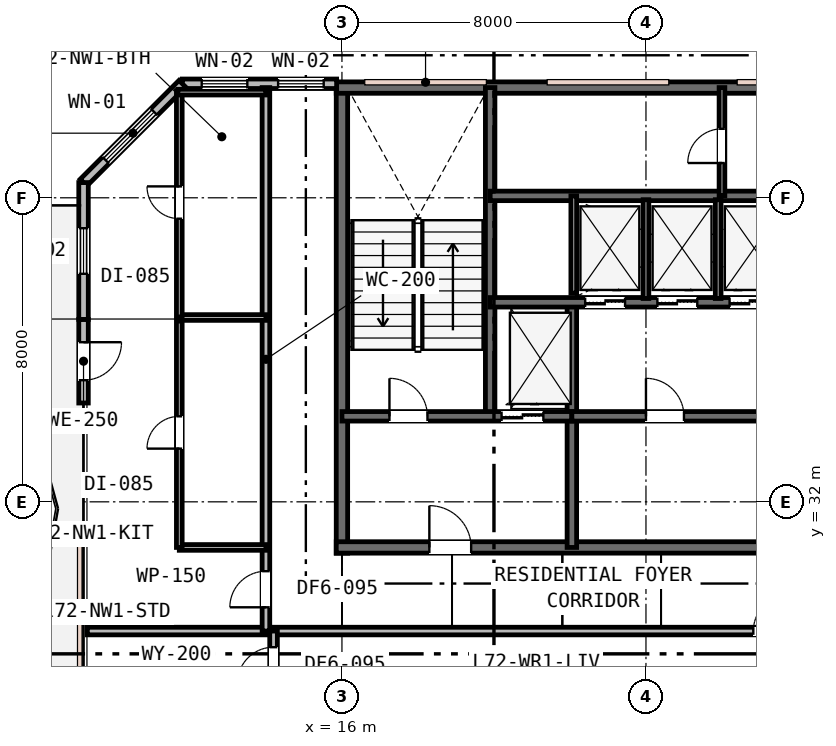
"""IFC4 building model, lengths in metres.
Left out: names, types, materials, properties, quantities, classifications, styles, units other than length and angle.
Written with IfcOpenShell. Run it as: python <this file> out.ifc"""

import sys

from ifc_helpers import new_model, si_unit, direction, frame, frame_2d, origin, place, context, subcontext, project, spatial, rectangle, extrude, element, fill, save


model = new_model("IFC4")
c1 = context("Model", 3, precision=1e-05, world=origin(), true_north=direction((0.0, 1.0)))
c2 = subcontext(c1, "Body", "Model", "MODEL_VIEW")
j1 = project(units=[si_unit("LENGTHUNIT", "METRE"), si_unit("PLANEANGLEUNIT", "RADIAN")], contexts=[c1])
p1 = place(None, origin())
s1 = spatial("IfcSite", under=j1, at=p1, CompositionType="ELEMENT")
p2 = place(p1, origin())
s2 = spatial("IfcBuilding", under=s1, at=p2, CompositionType="ELEMENT")
p3 = place(p2, frame((0.0, 0.0, 279.2)))
s3 = spatial("IfcBuildingStorey", under=s2, at=p3, CompositionType="ELEMENT", Elevation=279.2)
p4 = place(p3, frame((16.0, 30.65, 0.0), z_axis=(0.0, 0.0, 1.0), x_axis=(0.0, 1.0, 0.0)))
e1 = element("IfcWall", 1, at=p4, inside=s3, PredefinedType="SHEAR", context=c2, shape_type="SweptSolid", body=[
    extrude(rectangle(XDim=12.3, YDim=0.3, at=frame_2d((6.15, 0.0))), origin(), (0.0, 0.0, 1.0), 3.8),
])
p5 = place(p3, frame((15.85, 42.9, 0.0), z_axis=(0.0, 0.0, 1.0), x_axis=(1.0, 0.0, 0.0)))
e2 = element("IfcWall", 2, at=p5, inside=s3, PredefinedType="SHEAR", context=c2, shape_type="SweptSolid", body=[
    extrude(rectangle(XDim=24.3, YDim=0.3, at=frame_2d((12.15, 0.0))), origin(), (0.0, 0.0, 1.0), 3.8),
])
p6 = place(p3, frame((15.85, 30.8, 0.0), z_axis=(0.0, 0.0, 1.0), x_axis=(1.0, 0.0, 0.0)))
e3 = element("IfcWall", 3, at=p6, inside=s3, PredefinedType="SHEAR", context=c2, shape_type="SweptSolid", body=[
    extrude(rectangle(XDim=11.2, YDim=0.3, at=frame_2d((5.6, 0.0))), origin(), (0.0, 0.0, 1.0), 3.8),
])
p7 = place(p6, frame((2.45, 0.0, 0.0)))
e4 = element("IfcOpeningElement", 4, at=p7, cuts=e3, PredefinedType="OPENING", context=c2, shape_type="SweptSolid", body=[
    extrude(rectangle(XDim=1.1, YDim=2.15, at=frame_2d((0.55, 1.075))), frame((0.0, 0.16, 0.0), z_axis=(0.0, -1.0, 0.0), x_axis=(1.0, 0.0, 0.0)), (0.0, 0.0, 1.0), 0.32),
])
p8 = place(p3, frame((19.9, 34.25, 0.0), z_axis=(0.0, 0.0, 1.0), x_axis=(0.0, 1.0, 0.0)))
e5 = element("IfcWall", 5, at=p8, inside=s3, PredefinedType="SHEAR", context=c2, shape_type="SweptSolid", body=[
    extrude(rectangle(XDim=8.65, YDim=0.25, at=frame_2d((4.325, 0.0))), origin(), (0.0, 0.0, 1.0), 3.8),
])
p9 = place(p3, frame((22.05, 30.8, 0.0), z_axis=(0.0, 0.0, 1.0), x_axis=(0.0, 1.0, 0.0)))
e6 = element("IfcWall", 6, at=p9, inside=s3, PredefinedType="SHEAR", context=c2, shape_type="SweptSolid", body=[
    extrude(rectangle(XDim=6.45, YDim=0.25, at=frame_2d((3.225, 0.0))), origin(), (0.0, 0.0, 1.0), 3.8),
])
p10 = place(p3, frame((16.0, 34.25, 0.0), z_axis=(0.0, 0.0, 1.0), x_axis=(1.0, 0.0, 0.0)))
e7 = element("IfcWall", 7, at=p10, inside=s3, PredefinedType="SHEAR", context=c2, shape_type="SweptSolid", body=[
    extrude(rectangle(XDim=6.05, YDim=0.25, at=frame_2d((3.025, 0.0))), origin(), (0.0, 0.0, 1.0), 3.8),
])
p11 = place(p10, frame((1.25, 0.0, 0.0)))
e8 = element("IfcOpeningElement", 8, at=p11, cuts=e7, PredefinedType="OPENING", context=c2, shape_type="SweptSolid", body=[
    extrude(rectangle(XDim=1.0, YDim=2.15, at=frame_2d((0.5, 1.075))), frame((0.0, 0.135, 0.0), z_axis=(0.0, -1.0, 0.0), x_axis=(1.0, 0.0, 0.0)), (0.0, 0.0, 1.0), 0.27),
])
p12 = place(p10, frame((4.2, 0.0, 0.0)))
e9 = element("IfcOpeningElement", 9, at=p12, cuts=e7, PredefinedType="OPENING", context=c2, shape_type="SweptSolid", body=[
    extrude(rectangle(XDim=1.1, YDim=2.15, at=frame_2d((0.55, 1.075))), frame((0.0, 0.135, 0.0), z_axis=(0.0, -1.0, 0.0), x_axis=(1.0, 0.0, 0.0)), (0.0, 0.0, 1.0), 0.27),
])
p13 = place(p3, frame((22.05, 34.25, 0.0), z_axis=(0.0, 0.0, 1.0), x_axis=(1.0, 0.0, 0.0)))
e10 = element("IfcWall", 10, at=p13, inside=s3, PredefinedType="SHEAR", context=c2, shape_type="SweptSolid", body=[
    extrude(rectangle(XDim=5.0, YDim=0.25, at=frame_2d((2.5, 0.0))), origin(), (0.0, 0.0, 1.0), 3.8),
])
p14 = place(p13, frame((1.95, 0.0, 0.0)))
e11 = element("IfcOpeningElement", 11, at=p14, cuts=e10, PredefinedType="OPENING", context=c2, shape_type="SweptSolid", body=[
    extrude(rectangle(XDim=1.0, YDim=2.15, at=frame_2d((0.5, 1.075))), frame((0.0, 0.135, 0.0), z_axis=(0.0, -1.0, 0.0), x_axis=(1.0, 0.0, 0.0)), (0.0, 0.0, 1.0), 0.27),
])
p15 = place(p3, frame((19.9, 37.25, 0.0), z_axis=(0.0, 0.0, 1.0), x_axis=(1.0, 0.0, 0.0)))
e12 = element("IfcWall", 12, at=p15, inside=s3, PredefinedType="SHEAR", context=c2, shape_type="SweptSolid", body=[
    extrude(rectangle(XDim=16.2, YDim=0.25, at=frame_2d((8.1, 0.0))), origin(), (0.0, 0.0, 1.0), 3.8),
])
p16 = place(p15, frame((12.55, 0.0, 0.0)))
e13 = element("IfcOpeningElement", 13, at=p16, cuts=e12, PredefinedType="OPENING", context=c2, shape_type="SweptSolid", body=[
    extrude(rectangle(XDim=0.9, YDim=2.15, at=frame_2d((0.45, 1.075))), frame((0.0, 0.135, 0.0), z_axis=(0.0, -1.0, 0.0), x_axis=(1.0, 0.0, 0.0)), (0.0, 0.0, 1.0), 0.27),
])
p17 = place(p15, frame((2.5, 0.0, 0.0)))
e14 = element("IfcOpeningElement", 14, at=p17, cuts=e12, PredefinedType="OPENING", context=c2, shape_type="SweptSolid", body=[
    extrude(rectangle(XDim=1.05, YDim=2.15, at=frame_2d((0.525, 1.075))), frame((0.0, 0.135, 0.0), z_axis=(0.0, -1.0, 0.0), x_axis=(1.0, 0.0, 0.0)), (0.0, 0.0, 1.0), 0.27),
])
p18 = place(p15, frame((4.4, 0.0, 0.0)))
e15 = element("IfcOpeningElement", 15, at=p18, cuts=e12, PredefinedType="OPENING", context=c2, shape_type="SweptSolid", body=[
    extrude(rectangle(XDim=1.05, YDim=2.15, at=frame_2d((0.525, 1.075))), frame((0.0, 0.135, 0.0), z_axis=(0.0, -1.0, 0.0), x_axis=(1.0, 0.0, 0.0)), (0.0, 0.0, 1.0), 0.27),
])
p19 = place(p15, frame((6.3, 0.0, 0.0)))
e16 = element("IfcOpeningElement", 16, at=p19, cuts=e12, PredefinedType="OPENING", context=c2, shape_type="SweptSolid", body=[
    extrude(rectangle(XDim=1.05, YDim=2.15, at=frame_2d((0.525, 1.075))), frame((0.0, 0.135, 0.0), z_axis=(0.0, -1.0, 0.0), x_axis=(1.0, 0.0, 0.0)), (0.0, 0.0, 1.0), 0.27),
])
p20 = place(p3, frame((19.9, 40.05, 0.0), z_axis=(0.0, 0.0, 1.0), x_axis=(1.0, 0.0, 0.0)))
e17 = element("IfcWall", 17, at=p20, inside=s3, PredefinedType="SHEAR", context=c2, shape_type="SweptSolid", body=[
    extrude(rectangle(XDim=12.05, YDim=0.25, at=frame_2d((6.025, 0.0))), origin(), (0.0, 0.0, 1.0), 3.8),
])
p21 = place(p3, frame((15.86, 43.0, 0.0), z_axis=(0.0, 0.0, 1.0), x_axis=(-1.0, 0.0, 0.0)))
e18 = element("IfcWall", 18, at=p21, inside=s3, PredefinedType="STANDARD", context=c2, shape_type="SweptSolid", body=[
    extrude(rectangle(XDim=4.06, YDim=0.25, at=frame_2d((2.03, 0.0))), origin(), (0.0, 0.0, 1.0), 3.53),
])
p22 = place(p21, frame((0.34, 0.0, 0.85)))
e19 = element("IfcOpeningElement", 19, at=p22, cuts=e18, PredefinedType="OPENING", context=c2, shape_type="SweptSolid", body=[
    extrude(rectangle(XDim=1.2, YDim=1.6, at=frame_2d((0.6, 0.8))), frame((0.0, 0.135, 0.0), z_axis=(0.0, -1.0, 0.0), x_axis=(1.0, 0.0, 0.0)), (0.0, 0.0, 1.0), 0.27),
])
p23 = place(p21, frame((2.35, 0.0, 0.85)))
e20 = element("IfcOpeningElement", 20, at=p23, cuts=e18, PredefinedType="OPENING", context=c2, shape_type="SweptSolid", body=[
    extrude(rectangle(XDim=1.2, YDim=1.6, at=frame_2d((0.6, 0.8))), frame((0.0, 0.135, 0.0), z_axis=(0.0, -1.0, 0.0), x_axis=(1.0, 0.0, 0.0)), (0.0, 0.0, 1.0), 0.27),
])
p24 = place(p3, frame((11.8, 43.0, 0.0), z_axis=(0.0, 0.0, 1.0), x_axis=(-0.707106781187, -0.707106781187, 0.0)))
e21 = element("IfcWall", 21, at=p24, inside=s3, PredefinedType="STANDARD", context=c2, shape_type="SweptSolid", body=[
    extrude(rectangle(XDim=3.677, YDim=0.25, at=frame_2d((1.839, 0.0))), origin(), (0.0, 0.0, 1.0), 3.53),
])
p25 = place(p24, frame((1.049, 0.0, 0.75)))
e22 = element("IfcOpeningElement", 22, at=p25, cuts=e21, PredefinedType="OPENING", context=c2, shape_type="SweptSolid", body=[
    extrude(rectangle(XDim=1.8, YDim=1.85, at=frame_2d((0.9, 0.925))), frame((0.0, 0.135, 0.0), z_axis=(0.0, -1.0, 0.0), x_axis=(1.0, 0.0, 0.0)), (0.0, 0.0, 1.0), 0.27),
])
p26 = place(p3, frame((9.2, 36.8, 0.0), z_axis=(0.0, 0.0, 1.0), x_axis=(0.0, -1.0, 0.0)))
e23 = element("IfcWall", 23, at=p26, inside=s3, PredefinedType="STANDARD", context=c2, shape_type="SweptSolid", body=[
    extrude(rectangle(XDim=2.2, YDim=0.25, at=frame_2d((1.1, 0.0))), origin(), (0.0, 0.0, 1.0), 3.53),
])
p27 = place(p26, frame((0.6, 0.0, 0.0)))
e24 = element("IfcOpeningElement", 24, at=p27, cuts=e23, PredefinedType="OPENING", context=c2, shape_type="SweptSolid", body=[
    extrude(rectangle(XDim=1.0, YDim=2.15, at=frame_2d((0.5, 1.075))), frame((0.0, 0.135, 0.0), z_axis=(0.0, -1.0, 0.0), x_axis=(1.0, 0.0, 0.0)), (0.0, 0.0, 1.0), 0.27),
])
p28 = place(p3, frame((9.2, 40.4, 0.0), z_axis=(0.0, 0.0, 1.0), x_axis=(0.0, -1.0, 0.0)))
e25 = element("IfcWall", 25, at=p28, inside=s3, PredefinedType="STANDARD", context=c2, shape_type="SweptSolid", body=[
    extrude(rectangle(XDim=3.6, YDim=0.25, at=frame_2d((1.8, 0.0))), origin(), (0.0, 0.0, 1.0), 3.53),
])
p29 = place(p28, frame((1.2, 0.0, 0.85)))
e26 = element("IfcOpeningElement", 26, at=p29, cuts=e25, PredefinedType="OPENING", context=c2, shape_type="SweptSolid", body=[
    extrude(rectangle(XDim=1.2, YDim=1.6, at=frame_2d((0.6, 0.8))), frame((0.0, 0.135, 0.0), z_axis=(0.0, -1.0, 0.0), x_axis=(1.0, 0.0, 0.0)), (0.0, 0.0, 1.0), 0.27),
])
p30 = place(p3, frame((22.1, 37.49, 0.0), z_axis=(0.0, 0.0, 1.0), x_axis=(0.0, 1.0, 0.0)))
e27 = element("IfcWall", 27, at=p30, inside=s3, PredefinedType="PLUMBINGWALL", context=c2, shape_type="SweptSolid", body=[
    extrude(rectangle(XDim=2.56, YDim=0.15, at=frame_2d((1.28, 0.0))), origin(), (0.0, 0.0, 1.0), 3.53),
])
for number, where, z_axis, x_axis in (
    (28, (24.0, 37.35, 0.0), (0.0, 0.0, 1.0), (0.0, 1.0, 0.0)),
    (29, (25.9, 37.35, 0.0), (0.0, 0.0, 1.0), (0.0, 1.0, 0.0)),
):
    element("IfcWall", number, at=place(p3, frame(where, z_axis=z_axis, x_axis=x_axis)), inside=s3, PredefinedType="PLUMBINGWALL", context=c2, shape_type="SweptSolid", body=[
        extrude(rectangle(XDim=2.6, YDim=0.15, at=frame_2d((1.3, 0.0))), origin(), (0.0, 0.0, 1.0), 3.53),
    ])
p31 = place(p3, frame((26.0, 40.05, 0.0), z_axis=(0.0, 0.0, 1.0), x_axis=(0.0, 1.0, 0.0)))
e30 = element("IfcWall", 30, at=p31, inside=s3, PredefinedType="PARTITIONING", context=c2, shape_type="SweptSolid", body=[
    extrude(rectangle(XDim=2.85, YDim=0.15, at=frame_2d((1.425, 0.0))), origin(), (0.0, 0.0, 1.0), 3.53),
])
p32 = place(p31, frame((0.865, 0.0, 0.0)))
e31 = element("IfcOpeningElement", 31, at=p32, cuts=e30, PredefinedType="OPENING", context=c2, shape_type="SweptSolid", body=[
    extrude(rectangle(XDim=0.9, YDim=2.15, at=frame_2d((0.45, 1.075))), frame((0.0, 0.085, 0.0), z_axis=(0.0, -1.0, 0.0), x_axis=(1.0, 0.0, 0.0)), (0.0, 0.0, 1.0), 0.17),
])
p33 = place(p3, frame((9.3, 28.6, 0.0), z_axis=(0.0, 0.0, 1.0), x_axis=(1.0, 0.0, 0.0)))
e32 = element("IfcWall", 32, at=p33, inside=s3, PredefinedType="PARTITIONING", context=c2, shape_type="SweptSolid", body=[
    extrude(rectangle(XDim=4.7, YDim=0.2, at=frame_2d((2.35, 0.0))), origin(), (0.0, 0.0, 1.0), 3.53),
])
p34 = place(p3, frame((14.2, 28.6, 0.0), z_axis=(0.0, 0.0, 1.0), x_axis=(1.0, 0.0, 0.0)))
e33 = element("IfcWall", 33, at=p34, inside=s3, PredefinedType="PARTITIONING", context=c2, shape_type="SweptSolid", body=[
    extrude(rectangle(XDim=31.7, YDim=0.2, at=frame_2d((15.85, 0.0))), origin(), (0.0, 0.0, 1.0), 3.16),
])
p35 = place(p34, frame((12.625, 0.0, 0.0)))
e34 = element("IfcOpeningElement", 34, at=p35, cuts=e33, PredefinedType="OPENING", context=c2, shape_type="SweptSolid", body=[
    extrude(rectangle(XDim=0.95, YDim=2.15, at=frame_2d((0.475, 1.075))), frame((0.0, 0.11, 0.0), z_axis=(0.0, -1.0, 0.0), x_axis=(1.0, 0.0, 0.0)), (0.0, 0.0, 1.0), 0.22),
])
p36 = place(p34, frame((19.125, 0.0, 0.0)))
e35 = element("IfcOpeningElement", 35, at=p36, cuts=e33, PredefinedType="OPENING", context=c2, shape_type="SweptSolid", body=[
    extrude(rectangle(XDim=0.95, YDim=2.15, at=frame_2d((0.475, 1.075))), frame((0.0, 0.11, 0.0), z_axis=(0.0, -1.0, 0.0), x_axis=(1.0, 0.0, 0.0)), (0.0, 0.0, 1.0), 0.22),
])
p37 = place(p34, frame((24.016, 0.0, 0.0)))
e36 = element("IfcOpeningElement", 36, at=p37, cuts=e33, PredefinedType="OPENING", context=c2, shape_type="SweptSolid", body=[
    extrude(rectangle(XDim=0.95, YDim=2.15, at=frame_2d((0.475, 1.075))), frame((0.0, 0.11, 0.0), z_axis=(0.0, -1.0, 0.0), x_axis=(1.0, 0.0, 0.0)), (0.0, 0.0, 1.0), 0.22),
])
p38 = place(p3, frame((14.0, 28.6, 0.0), z_axis=(0.0, 0.0, 1.0), x_axis=(0.0, 1.0, 0.0)))
e37 = element("IfcWall", 37, at=p38, inside=s3, PredefinedType="PARTITIONING", context=c2, shape_type="SweptSolid", body=[
    extrude(rectangle(XDim=14.3, YDim=0.2, at=frame_2d((7.15, 0.0))), origin(), (0.0, 0.0, 1.0), 3.53),
])
p39 = place(p38, frame((0.625, 0.0, 0.0)))
e38 = element("IfcOpeningElement", 38, at=p39, cuts=e37, PredefinedType="OPENING", context=c2, shape_type="SweptSolid", body=[
    extrude(rectangle(XDim=0.95, YDim=2.15, at=frame_2d((0.475, 1.075))), frame((0.0, 0.11, 0.0), z_axis=(0.0, -1.0, 0.0), x_axis=(1.0, 0.0, 0.0)), (0.0, 0.0, 1.0), 0.22),
])
for number, where, z_axis, x_axis in (
    (39, (11.72, 30.8, 0.0), (0.0, 0.0, 1.0), (1.0, 0.0, 0.0)),
    (40, (11.72, 36.85, 0.0), (0.0, 0.0, 1.0), (1.0, 0.0, 0.0)),
):
    element("IfcWall", number, at=place(p3, frame(where, z_axis=z_axis, x_axis=x_axis)), inside=s3, PredefinedType="PARTITIONING", context=c2, shape_type="SweptSolid", body=[
        extrude(rectangle(XDim=2.28, YDim=0.15, at=frame_2d((1.14, 0.0))), origin(), (0.0, 0.0, 1.0), 3.53),
    ])
p40 = place(p3, frame((11.72, 30.8, 0.0), z_axis=(0.0, 0.0, 1.0), x_axis=(0.0, 1.0, 0.0)))
e41 = element("IfcWall", 41, at=p40, inside=s3, PredefinedType="PARTITIONING", context=c2, shape_type="SweptSolid", body=[
    extrude(rectangle(XDim=12.02, YDim=0.15, at=frame_2d((6.01, 0.0))), origin(), (0.0, 0.0, 1.0), 3.53),
])
p41 = place(p40, frame((2.6, 0.0, 0.0)))
e42 = element("IfcOpeningElement", 42, at=p41, cuts=e41, PredefinedType="OPENING", context=c2, shape_type="SweptSolid", body=[
    extrude(rectangle(XDim=0.85, YDim=2.15, at=frame_2d((0.425, 1.075))), frame((0.0, 0.085, 0.0), z_axis=(0.0, -1.0, 0.0), x_axis=(1.0, 0.0, 0.0)), (0.0, 0.0, 1.0), 0.17),
])
p42 = place(p40, frame((8.65, 0.0, 0.0)))
e43 = element("IfcOpeningElement", 43, at=p42, cuts=e41, PredefinedType="OPENING", context=c2, shape_type="SweptSolid", body=[
    extrude(rectangle(XDim=0.85, YDim=2.15, at=frame_2d((0.425, 1.075))), frame((0.0, 0.085, 0.0), z_axis=(0.0, -1.0, 0.0), x_axis=(1.0, 0.0, 0.0)), (0.0, 0.0, 1.0), 0.17),
])
p43 = place(p3, frame((11.68, 42.78, 0.0), z_axis=(0.0, 0.0, 1.0), x_axis=(1.0, 0.0, 0.0)))
e44 = element("IfcWall", 44, at=p43, inside=s3, PredefinedType="PARTITIONING", context=c2, shape_type="SweptSolid", body=[
    extrude(rectangle(XDim=2.32, YDim=0.15, at=frame_2d((1.16, 0.0))), origin(), (0.0, 0.0, 1.0), 3.53),
])
p44 = place(p3, frame((14.2, 17.0, 0.0), z_axis=(0.0, 0.0, 1.0), x_axis=(0.0, 1.0, 0.0)))
e45 = element("IfcWall", 45, at=p44, inside=s3, PredefinedType="PARTITIONING", context=c2, shape_type="SweptSolid", body=[
    extrude(rectangle(XDim=11.6, YDim=0.2, at=frame_2d((5.8, 0.0))), origin(), (0.0, 0.0, 1.0), 3.53),
])
p45 = place(p44, frame((10.225, 0.0, 0.0)))
e46 = element("IfcOpeningElement", 46, at=p45, cuts=e45, PredefinedType="OPENING", context=c2, shape_type="SweptSolid", body=[
    extrude(rectangle(XDim=0.95, YDim=2.15, at=frame_2d((0.475, 1.075))), frame((0.0, 0.11, 0.0), z_axis=(0.0, -1.0, 0.0), x_axis=(1.0, 0.0, 0.0)), (0.0, 0.0, 1.0), 0.22),
])
p46 = place(p22, origin())
e47 = element("IfcWindow", 47, at=p46, inside=s3, PartitioningType="SINGLE_PANEL", PredefinedType="WINDOW", context=c2, shape_type="SweptSolid", body=[
    extrude(rectangle(XDim=1.2, YDim=1.6, at=frame_2d((0.6, 0.8))), frame((0.0, 0.03, 0.0), z_axis=(0.0, -1.0, 0.0), x_axis=(1.0, 0.0, 0.0)), (0.0, 0.0, 1.0), 0.06),
])
fill(e19, e47)
p47 = place(p23, origin())
e48 = element("IfcWindow", 48, at=p47, inside=s3, PartitioningType="SINGLE_PANEL", PredefinedType="WINDOW", context=c2, shape_type="SweptSolid", body=[
    extrude(rectangle(XDim=1.2, YDim=1.6, at=frame_2d((0.6, 0.8))), frame((0.0, 0.03, 0.0), z_axis=(0.0, -1.0, 0.0), x_axis=(1.0, 0.0, 0.0)), (0.0, 0.0, 1.0), 0.06),
])
fill(e20, e48)
p48 = place(p25, origin())
e49 = element("IfcWindow", 49, at=p48, inside=s3, PartitioningType="SINGLE_PANEL", PredefinedType="WINDOW", context=c2, shape_type="SweptSolid", body=[
    extrude(rectangle(XDim=1.8, YDim=1.85, at=frame_2d((0.9, 0.925))), frame((0.0, 0.03, 0.0), z_axis=(0.0, -1.0, 0.0), x_axis=(1.0, 0.0, 0.0)), (0.0, 0.0, 1.0), 0.06),
])
fill(e22, e49)
p49 = place(p27, origin())
e50 = element("IfcDoor", 50, at=p49, inside=s3, OperationType="SINGLE_SWING_LEFT", PredefinedType="DOOR", context=c2, shape_type="SweptSolid", body=[
    extrude(rectangle(XDim=1.0, YDim=2.15, at=frame_2d((0.5, 1.075))), frame((0.0, 0.025, 0.0), z_axis=(0.0, -1.0, 0.0), x_axis=(1.0, 0.0, 0.0)), (0.0, 0.0, 1.0), 0.05),
])
fill(e24, e50)
p50 = place(p29, origin())
e51 = element("IfcWindow", 51, at=p50, inside=s3, PartitioningType="SINGLE_PANEL", PredefinedType="WINDOW", context=c2, shape_type="SweptSolid", body=[
    extrude(rectangle(XDim=1.2, YDim=1.6, at=frame_2d((0.6, 0.8))), frame((0.0, 0.03, 0.0), z_axis=(0.0, -1.0, 0.0), x_axis=(1.0, 0.0, 0.0)), (0.0, 0.0, 1.0), 0.06),
])
fill(e26, e51)
p51 = place(p11, origin())
e52 = element("IfcDoor", 52, at=p51, inside=s3, OperationType="SINGLE_SWING_LEFT", PredefinedType="DOOR", context=c2, shape_type="SweptSolid", body=[
    extrude(rectangle(XDim=1.0, YDim=2.15, at=frame_2d((0.5, 1.075))), frame((0.0, 0.025, 0.0), z_axis=(0.0, -1.0, 0.0), x_axis=(1.0, 0.0, 0.0)), (0.0, 0.0, 1.0), 0.05),
])
fill(e8, e52)
p52 = place(p7, origin())
e53 = element("IfcDoor", 53, at=p52, inside=s3, OperationType="SINGLE_SWING_LEFT", PredefinedType="DOOR", context=c2, shape_type="SweptSolid", body=[
    extrude(rectangle(XDim=1.1, YDim=2.15, at=frame_2d((0.55, 1.075))), frame((0.0, 0.025, 0.0), z_axis=(0.0, -1.0, 0.0), x_axis=(1.0, 0.0, 0.0)), (0.0, 0.0, 1.0), 0.05),
])
fill(e4, e53)
p53 = place(p14, origin())
e54 = element("IfcDoor", 54, at=p53, inside=s3, OperationType="SINGLE_SWING_LEFT", PredefinedType="DOOR", context=c2, shape_type="SweptSolid", body=[
    extrude(rectangle(XDim=1.0, YDim=2.15, at=frame_2d((0.5, 1.075))), frame((0.0, 0.025, 0.0), z_axis=(0.0, -1.0, 0.0), x_axis=(1.0, 0.0, 0.0)), (0.0, 0.0, 1.0), 0.05),
])
fill(e11, e54)
p54 = place(p32, origin())
e55 = element("IfcDoor", 55, at=p54, inside=s3, OperationType="SINGLE_SWING_LEFT", PredefinedType="DOOR", context=c2, shape_type="SweptSolid", body=[
    extrude(rectangle(XDim=0.9, YDim=2.15, at=frame_2d((0.45, 1.075))), frame((0.0, 0.025, 0.0), z_axis=(0.0, -1.0, 0.0), x_axis=(1.0, 0.0, 0.0)), (0.0, 0.0, 1.0), 0.05),
])
fill(e31, e55)
p55 = place(p39, origin())
e56 = element("IfcDoor", 56, at=p55, inside=s3, OperationType="SINGLE_SWING_LEFT", PredefinedType="DOOR", context=c2, shape_type="SweptSolid", body=[
    extrude(rectangle(XDim=0.95, YDim=2.15, at=frame_2d((0.475, 1.075))), frame((0.0, 0.025, 0.0), z_axis=(0.0, -1.0, 0.0), x_axis=(1.0, 0.0, 0.0)), (0.0, 0.0, 1.0), 0.05),
])
fill(e38, e56)
p56 = place(p41, origin())
e57 = element("IfcDoor", 57, at=p56, inside=s3, OperationType="SINGLE_SWING_LEFT", PredefinedType="DOOR", context=c2, shape_type="SweptSolid", body=[
    extrude(rectangle(XDim=0.85, YDim=2.15, at=frame_2d((0.425, 1.075))), frame((0.0, 0.025, 0.0), z_axis=(0.0, -1.0, 0.0), x_axis=(1.0, 0.0, 0.0)), (0.0, 0.0, 1.0), 0.05),
])
fill(e42, e57)
p57 = place(p42, origin())
e58 = element("IfcDoor", 58, at=p57, inside=s3, OperationType="SINGLE_SWING_RIGHT", PredefinedType="DOOR", context=c2, shape_type="SweptSolid", body=[
    extrude(rectangle(XDim=0.85, YDim=2.15, at=frame_2d((0.425, 1.075))), frame((0.0, 0.025, 0.0), z_axis=(0.0, -1.0, 0.0), x_axis=(1.0, 0.0, 0.0)), (0.0, 0.0, 1.0), 0.05),
])
fill(e43, e58)
p58 = place(p35, origin())
e59 = element("IfcDoor", 59, at=p58, inside=s3, OperationType="SINGLE_SWING_RIGHT", PredefinedType="DOOR", context=c2, shape_type="SweptSolid", body=[
    extrude(rectangle(XDim=0.95, YDim=2.15, at=frame_2d((0.475, 1.075))), frame((0.0, 0.025, 0.0), z_axis=(0.0, -1.0, 0.0), x_axis=(1.0, 0.0, 0.0)), (0.0, 0.0, 1.0), 0.05),
])
fill(e34, e59)
p59 = place(p45, origin())
e60 = element("IfcDoor", 60, at=p59, inside=s3, OperationType="SINGLE_SWING_LEFT", PredefinedType="DOOR", context=c2, shape_type="SweptSolid", body=[
    extrude(rectangle(XDim=0.95, YDim=2.15, at=frame_2d((0.475, 1.075))), frame((0.0, 0.025, 0.0), z_axis=(0.0, -1.0, 0.0), x_axis=(1.0, 0.0, 0.0)), (0.0, 0.0, 1.0), 0.05),
])
fill(e46, e60)
p60 = place(p12, origin())
e61 = element("IfcDoor", 61, at=p60, inside=s3, OperationType="DOUBLE_DOOR_SLIDING", PredefinedType="DOOR", context=c2, shape_type="SweptSolid", body=[
    extrude(rectangle(XDim=1.1, YDim=2.15, at=frame_2d((0.55, 1.075))), frame((0.0, 0.025, 0.0), z_axis=(0.0, -1.0, 0.0), x_axis=(1.0, 0.0, 0.0)), (0.0, 0.0, 1.0), 0.05),
])
fill(e9, e61)
p61 = place(p17, origin())
e62 = element("IfcDoor", 62, at=p61, inside=s3, OperationType="DOUBLE_DOOR_SLIDING", PredefinedType="DOOR", context=c2, shape_type="SweptSolid", body=[
    extrude(rectangle(XDim=1.05, YDim=2.15, at=frame_2d((0.525, 1.075))), frame((0.0, 0.025, 0.0), z_axis=(0.0, -1.0, 0.0), x_axis=(1.0, 0.0, 0.0)), (0.0, 0.0, 1.0), 0.05),
])
fill(e14, e62)
p62 = place(p18, origin())
e63 = element("IfcDoor", 63, at=p62, inside=s3, OperationType="DOUBLE_DOOR_SLIDING", PredefinedType="DOOR", context=c2, shape_type="SweptSolid", body=[
    extrude(rectangle(XDim=1.05, YDim=2.15, at=frame_2d((0.525, 1.075))), frame((0.0, 0.025, 0.0), z_axis=(0.0, -1.0, 0.0), x_axis=(1.0, 0.0, 0.0)), (0.0, 0.0, 1.0), 0.05),
])
fill(e15, e63)
p63 = place(p19, origin())
e64 = element("IfcDoor", 64, at=p63, inside=s3, OperationType="DOUBLE_DOOR_SLIDING", PredefinedType="DOOR", context=c2, shape_type="SweptSolid", body=[
    extrude(rectangle(XDim=1.05, YDim=2.15, at=frame_2d((0.525, 1.075))), frame((0.0, 0.025, 0.0), z_axis=(0.0, -1.0, 0.0), x_axis=(1.0, 0.0, 0.0)), (0.0, 0.0, 1.0), 0.05),
])
fill(e16, e64)
save(model, sys.argv[1])
